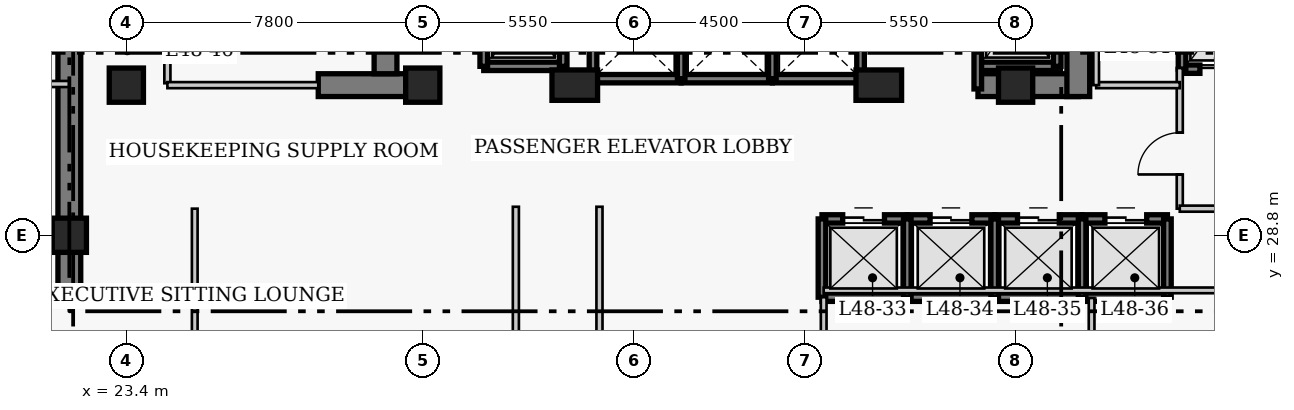
"""IFC4 building model, lengths in metres.
Left out: names, types, materials, properties, quantities, classifications, styles, units other than length and angle.
Written with IfcOpenShell. Run it as: python <this file> out.ifc"""

import sys

from ifc_helpers import new_model, si_unit, direction, frame, frame_2d, origin, origin_2d, place, context, subcontext, project, spatial, rectangle, extrude, element, fill, save


model = new_model("IFC4")
c1 = context("Model", 3, precision=1e-05, world=origin(), true_north=direction((0.0, 1.0)))
c2 = subcontext(c1, "Body", "Model", "MODEL_VIEW")
j1 = project(units=[si_unit("LENGTHUNIT", "METRE"), si_unit("PLANEANGLEUNIT", "RADIAN")], contexts=[c1])
p1 = place(None, origin())
s1 = spatial("IfcSite", under=j1, at=p1, CompositionType="ELEMENT")
p2 = place(p1, origin())
s2 = spatial("IfcBuilding", under=s1, at=p2, CompositionType="ELEMENT")
p3 = place(p2, frame((0.0, 0.0, 192.9)))
s3 = spatial("IfcBuildingStorey", under=s2, at=p3, CompositionType="ELEMENT", Elevation=192.9)
p4 = place(p3, frame((21.9, 27.05, 0.0), z_axis=(0.0, 0.0, 1.0), x_axis=(0.0, 1.0, 0.0)))
e1 = element("IfcWall", 1, at=p4, inside=s3, PredefinedType="SHEAR", context=c2, shape_type="SweptSolid", body=[
    extrude(rectangle(XDim=13.57, YDim=0.6, at=frame_2d((6.785, 0.0))), origin(), (0.0, 0.0, 1.0), 3.9),
])
p5 = place(p3, frame((28.45, 32.75, 0.0), z_axis=(0.0, 0.0, 1.0), x_axis=(1.0, 0.0, 0.0)))
e2 = element("IfcWall", 2, at=p5, inside=s3, PredefinedType="SHEAR", context=c2, shape_type="SweptSolid", body=[
    extrude(rectangle(XDim=2.4, YDim=0.6, at=frame_2d((1.2, 0.0))), origin(), (0.0, 0.0, 1.0), 3.9),
])
p6 = place(p3, frame((45.81, 32.75, 0.0), z_axis=(0.0, 0.0, 1.0), x_axis=(1.0, 0.0, 0.0)))
e3 = element("IfcWall", 3, at=p6, inside=s3, PredefinedType="SHEAR", context=c2, shape_type="SweptSolid", body=[
    extrude(rectangle(XDim=2.64, YDim=0.6, at=frame_2d((1.32, 0.0))), origin(), (0.0, 0.0, 1.0), 3.9),
])
p7 = place(p3, frame((30.22, 33.05, 0.0), z_axis=(0.0, 0.0, 1.0), x_axis=(0.0, 1.0, 0.0)))
e4 = element("IfcWall", 4, at=p7, inside=s3, PredefinedType="SHEAR", context=c2, shape_type="SweptSolid", body=[
    extrude(rectangle(XDim=7.27, YDim=0.6, at=frame_2d((3.635, 0.0))), origin(), (0.0, 0.0, 1.0), 3.9),
])
p8 = place(p3, frame((48.45, 32.45, 0.0), z_axis=(0.0, 0.0, 1.0), x_axis=(0.0, 1.0, 0.0)))
e5 = element("IfcWall", 5, at=p8, inside=s3, PredefinedType="SHEAR", context=c2, shape_type="SweptSolid", body=[
    extrude(rectangle(XDim=7.87, YDim=0.6, at=frame_2d((3.935, 0.0))), origin(), (0.0, 0.0, 1.0), 3.9),
])
p9 = place(p8, frame((5.75, 0.0, 0.0)))
e6 = element("IfcOpeningElement", 6, at=p9, cuts=e5, PredefinedType="OPENING", context=c2, shape_type="SweptSolid", body=[
    extrude(rectangle(XDim=1.1, YDim=2.15, at=frame_2d((0.55, 1.075))), frame((0.0, 0.31, 0.0), z_axis=(0.0, -1.0, 0.0), x_axis=(1.0, 0.0, 0.0)), (0.0, 0.0, 1.0), 0.62),
])
for number, where, z_axis, x_axis in (
    (7, (21.9, 28.8, 0.0), (0.0, 0.0, 1.0), (1.0, 0.0, 0.0)),
    (8, (23.4, 32.75, 0.0), (0.0, 0.0, 1.0), (1.0, 0.0, 0.0)),
    (9, (31.2, 32.75, 0.0), (0.0, 0.0, 1.0), (1.0, 0.0, 0.0)),
):
    element("IfcColumn", number, at=place(p3, frame(where, z_axis=z_axis, x_axis=x_axis)), inside=s3, PredefinedType="COLUMN", context=c2, shape_type="SweptSolid", body=[
        extrude(rectangle(XDim=0.9, YDim=0.9, at=origin_2d()), origin(), (0.0, 0.0, 1.0), 3.9),
    ])
for number, where, z_axis, x_axis in (
    (10, (35.2, 32.75, 0.0), (0.0, 0.0, 1.0), (1.0, 0.0, 0.0)),
    (11, (43.2, 32.75, 0.0), (0.0, 0.0, 1.0), (1.0, 0.0, 0.0)),
):
    element("IfcColumn", number, at=place(p3, frame(where, z_axis=z_axis, x_axis=x_axis)), inside=s3, PredefinedType="COLUMN", context=c2, shape_type="SweptSolid", body=[
        extrude(rectangle(XDim=1.2, YDim=0.8, at=origin_2d()), origin(), (0.0, 0.0, 1.0), 3.9),
    ])
p10 = place(p3, frame((46.8, 32.75, 0.0), z_axis=(0.0, 0.0, 1.0), x_axis=(1.0, 0.0, 0.0)))
e12 = element("IfcColumn", 12, at=p10, inside=s3, PredefinedType="COLUMN", context=c2, shape_type="SweptSolid", body=[
    extrude(rectangle(XDim=0.9, YDim=0.9, at=origin_2d()), origin(), (0.0, 0.0, 1.0), 3.9),
])
p11 = place(p3, frame((41.705, 29.23, 0.0), z_axis=(0.0, 0.0, 1.0), x_axis=(1.0, 0.0, 0.0)))
e13 = element("IfcWall", 13, at=p11, inside=s3, PredefinedType="SHEAR", context=c2, shape_type="SweptSolid", body=[
    extrude(rectangle(XDim=2.245, YDim=0.22, at=frame_2d((1.123, 0.0))), origin(), (0.0, 0.0, 1.0), 3.9),
])
p12 = place(p11, frame((0.545, 0.0, 0.0)))
e14 = element("IfcOpeningElement", 14, at=p12, cuts=e13, PredefinedType="OPENING", context=c2, shape_type="SweptSolid", body=[
    extrude(rectangle(XDim=1.1, YDim=2.15, at=frame_2d((0.55, 1.075))), frame((0.0, 0.12, 0.0), z_axis=(0.0, -1.0, 0.0), x_axis=(1.0, 0.0, 0.0)), (0.0, 0.0, 1.0), 0.24),
])
p13 = place(p3, frame((41.705, 27.17, 0.0), z_axis=(0.0, 0.0, 1.0), x_axis=(1.0, 0.0, 0.0)))
e15 = element("IfcWall", 15, at=p13, inside=s3, PredefinedType="SHEAR", context=c2, shape_type="SweptSolid", body=[
    extrude(rectangle(XDim=2.245, YDim=0.22, at=frame_2d((1.123, 0.0))), origin(), (0.0, 0.0, 1.0), 3.9),
])
p14 = place(p3, frame((41.705, 27.17, 0.0), z_axis=(0.0, 0.0, 1.0), x_axis=(0.0, 1.0, 0.0)))
e16 = element("IfcWall", 16, at=p14, inside=s3, PredefinedType="SHEAR", context=c2, shape_type="SweptSolid", body=[
    extrude(rectangle(XDim=2.06, YDim=0.2, at=frame_2d((1.03, 0.0))), origin(), (0.0, 0.0, 1.0), 3.9),
])
p15 = place(p3, frame((43.95, 29.23, 0.0), z_axis=(0.0, 0.0, 1.0), x_axis=(1.0, 0.0, 0.0)))
e17 = element("IfcWall", 17, at=p15, inside=s3, PredefinedType="SHEAR", context=c2, shape_type="SweptSolid", body=[
    extrude(rectangle(XDim=2.3, YDim=0.22, at=frame_2d((1.15, 0.0))), origin(), (0.0, 0.0, 1.0), 3.9),
])
p16 = place(p15, frame((0.6, 0.0, 0.0)))
e18 = element("IfcOpeningElement", 18, at=p16, cuts=e17, PredefinedType="OPENING", context=c2, shape_type="SweptSolid", body=[
    extrude(rectangle(XDim=1.1, YDim=2.15, at=frame_2d((0.55, 1.075))), frame((0.0, 0.12, 0.0), z_axis=(0.0, -1.0, 0.0), x_axis=(1.0, 0.0, 0.0)), (0.0, 0.0, 1.0), 0.24),
])
p17 = place(p3, frame((43.95, 27.17, 0.0), z_axis=(0.0, 0.0, 1.0), x_axis=(1.0, 0.0, 0.0)))
e19 = element("IfcWall", 19, at=p17, inside=s3, PredefinedType="SHEAR", context=c2, shape_type="SweptSolid", body=[
    extrude(rectangle(XDim=2.3, YDim=0.22, at=frame_2d((1.15, 0.0))), origin(), (0.0, 0.0, 1.0), 3.9),
])
p18 = place(p3, frame((43.95, 27.17, 0.0), z_axis=(0.0, 0.0, 1.0), x_axis=(0.0, 1.0, 0.0)))
e20 = element("IfcWall", 20, at=p18, inside=s3, PredefinedType="SHEAR", context=c2, shape_type="SweptSolid", body=[
    extrude(rectangle(XDim=2.06, YDim=0.2, at=frame_2d((1.03, 0.0))), origin(), (0.0, 0.0, 1.0), 3.9),
])
p19 = place(p3, frame((46.25, 29.23, 0.0), z_axis=(0.0, 0.0, 1.0), x_axis=(1.0, 0.0, 0.0)))
e21 = element("IfcWall", 21, at=p19, inside=s3, PredefinedType="SHEAR", context=c2, shape_type="SweptSolid", body=[
    extrude(rectangle(XDim=2.3, YDim=0.22, at=frame_2d((1.15, 0.0))), origin(), (0.0, 0.0, 1.0), 3.9),
])
p20 = place(p19, frame((0.6, 0.0, 0.0)))
e22 = element("IfcOpeningElement", 22, at=p20, cuts=e21, PredefinedType="OPENING", context=c2, shape_type="SweptSolid", body=[
    extrude(rectangle(XDim=1.1, YDim=2.15, at=frame_2d((0.55, 1.075))), frame((0.0, 0.12, 0.0), z_axis=(0.0, -1.0, 0.0), x_axis=(1.0, 0.0, 0.0)), (0.0, 0.0, 1.0), 0.24),
])
p21 = place(p3, frame((46.25, 27.17, 0.0), z_axis=(0.0, 0.0, 1.0), x_axis=(1.0, 0.0, 0.0)))
e23 = element("IfcWall", 23, at=p21, inside=s3, PredefinedType="SHEAR", context=c2, shape_type="SweptSolid", body=[
    extrude(rectangle(XDim=2.3, YDim=0.22, at=frame_2d((1.15, 0.0))), origin(), (0.0, 0.0, 1.0), 3.9),
])
p22 = place(p3, frame((46.25, 27.17, 0.0), z_axis=(0.0, 0.0, 1.0), x_axis=(0.0, 1.0, 0.0)))
e24 = element("IfcWall", 24, at=p22, inside=s3, PredefinedType="SHEAR", context=c2, shape_type="SweptSolid", body=[
    extrude(rectangle(XDim=2.06, YDim=0.2, at=frame_2d((1.03, 0.0))), origin(), (0.0, 0.0, 1.0), 3.9),
])
p23 = place(p3, frame((48.55, 29.23, 0.0), z_axis=(0.0, 0.0, 1.0), x_axis=(1.0, 0.0, 0.0)))
e25 = element("IfcWall", 25, at=p23, inside=s3, PredefinedType="SHEAR", context=c2, shape_type="SweptSolid", body=[
    extrude(rectangle(XDim=2.245, YDim=0.22, at=frame_2d((1.123, 0.0))), origin(), (0.0, 0.0, 1.0), 3.9),
])
p24 = place(p23, frame((0.6, 0.0, 0.0)))
e26 = element("IfcOpeningElement", 26, at=p24, cuts=e25, PredefinedType="OPENING", context=c2, shape_type="SweptSolid", body=[
    extrude(rectangle(XDim=1.1, YDim=2.15, at=frame_2d((0.55, 1.075))), frame((0.0, 0.12, 0.0), z_axis=(0.0, -1.0, 0.0), x_axis=(1.0, 0.0, 0.0)), (0.0, 0.0, 1.0), 0.24),
])
p25 = place(p3, frame((48.55, 27.17, 0.0), z_axis=(0.0, 0.0, 1.0), x_axis=(1.0, 0.0, 0.0)))
e27 = element("IfcWall", 27, at=p25, inside=s3, PredefinedType="SHEAR", context=c2, shape_type="SweptSolid", body=[
    extrude(rectangle(XDim=2.245, YDim=0.22, at=frame_2d((1.123, 0.0))), origin(), (0.0, 0.0, 1.0), 3.9),
])
for number, where, z_axis, x_axis in (
    (28, (48.55, 27.17, 0.0), (0.0, 0.0, 1.0), (0.0, 1.0, 0.0)),
    (29, (50.795, 27.17, 0.0), (0.0, 0.0, 1.0), (0.0, 1.0, 0.0)),
):
    element("IfcWall", number, at=place(p3, frame(where, z_axis=z_axis, x_axis=x_axis)), inside=s3, PredefinedType="SHEAR", context=c2, shape_type="SweptSolid", body=[
        extrude(rectangle(XDim=2.06, YDim=0.2, at=frame_2d((1.03, 0.0))), origin(), (0.0, 0.0, 1.0), 3.9),
    ])
p26 = place(p3, frame((35.68, 32.92, 0.0), z_axis=(0.0, 0.0, 1.0), x_axis=(1.0, 0.0, 0.0)))
e30 = element("IfcWall", 30, at=p26, inside=s3, PredefinedType="SHEAR", context=c2, shape_type="SweptSolid", body=[
    extrude(rectangle(XDim=2.32, YDim=0.22, at=frame_2d((1.16, 0.0))), origin(), (0.0, 0.0, 1.0), 3.9),
])
p27 = place(p3, frame((35.68, 32.92, 0.0), z_axis=(0.0, 0.0, 1.0), x_axis=(0.0, 1.0, 0.0)))
e31 = element("IfcWall", 31, at=p27, inside=s3, PredefinedType="SHEAR", context=c2, shape_type="SweptSolid", body=[
    extrude(rectangle(XDim=2.16, YDim=0.2, at=frame_2d((1.08, 0.0))), origin(), (0.0, 0.0, 1.0), 3.9),
])
p28 = place(p3, frame((38.0, 32.92, 0.0), z_axis=(0.0, 0.0, 1.0), x_axis=(1.0, 0.0, 0.0)))
e32 = element("IfcWall", 32, at=p28, inside=s3, PredefinedType="SHEAR", context=c2, shape_type="SweptSolid", body=[
    extrude(rectangle(XDim=2.4, YDim=0.22, at=frame_2d((1.2, 0.0))), origin(), (0.0, 0.0, 1.0), 3.9),
])
p29 = place(p3, frame((38.0, 32.92, 0.0), z_axis=(0.0, 0.0, 1.0), x_axis=(0.0, 1.0, 0.0)))
e33 = element("IfcWall", 33, at=p29, inside=s3, PredefinedType="SHEAR", context=c2, shape_type="SweptSolid", body=[
    extrude(rectangle(XDim=2.16, YDim=0.2, at=frame_2d((1.08, 0.0))), origin(), (0.0, 0.0, 1.0), 3.9),
])
p30 = place(p3, frame((40.4, 32.92, 0.0), z_axis=(0.0, 0.0, 1.0), x_axis=(1.0, 0.0, 0.0)))
e34 = element("IfcWall", 34, at=p30, inside=s3, PredefinedType="SHEAR", context=c2, shape_type="SweptSolid", body=[
    extrude(rectangle(XDim=2.32, YDim=0.22, at=frame_2d((1.16, 0.0))), origin(), (0.0, 0.0, 1.0), 3.9),
])
for number, where, z_axis, x_axis in (
    (35, (40.4, 32.92, 0.0), (0.0, 0.0, 1.0), (0.0, 1.0, 0.0)),
    (36, (42.72, 32.92, 0.0), (0.0, 0.0, 1.0), (0.0, 1.0, 0.0)),
):
    element("IfcWall", number, at=place(p3, frame(where, z_axis=z_axis, x_axis=x_axis)), inside=s3, PredefinedType="SHEAR", context=c2, shape_type="SweptSolid", body=[
        extrude(rectangle(XDim=2.16, YDim=0.2, at=frame_2d((1.08, 0.0))), origin(), (0.0, 0.0, 1.0), 3.9),
    ])
p31 = place(p3, frame((51.18, 33.17, 0.0), z_axis=(0.0, 0.0, 1.0), x_axis=(1.0, 0.0, 0.0)))
e37 = element("IfcWall", 37, at=p31, inside=s3, PredefinedType="SHEAR", context=c2, shape_type="SweptSolid", body=[
    extrude(rectangle(XDim=2.42, YDim=0.22, at=frame_2d((1.21, 0.0))), origin(), (0.0, 0.0, 1.0), 3.9),
])
p32 = place(p31, frame((0.47, 0.0, 0.0)))
e38 = element("IfcOpeningElement", 38, at=p32, cuts=e37, PredefinedType="OPENING", context=c2, shape_type="SweptSolid", body=[
    extrude(rectangle(XDim=1.3, YDim=2.15, at=frame_2d((0.65, 1.075))), frame((0.0, 0.12, 0.0), z_axis=(0.0, -1.0, 0.0), x_axis=(1.0, 0.0, 0.0)), (0.0, 0.0, 1.0), 0.24),
])
p33 = place(p3, frame((51.18, 33.17, 0.0), z_axis=(0.0, 0.0, 1.0), x_axis=(0.0, 1.0, 0.0)))
e39 = element("IfcWall", 39, at=p33, inside=s3, PredefinedType="SHEAR", context=c2, shape_type="SweptSolid", body=[
    extrude(rectangle(XDim=2.86, YDim=0.2, at=frame_2d((1.43, 0.0))), origin(), (0.0, 0.0, 1.0), 3.9),
])
p34 = place(p3, frame((32.805, 33.245, 0.0), z_axis=(0.0, 0.0, 1.0), x_axis=(1.0, 0.0, 0.0)))
e40 = element("IfcWall", 40, at=p34, inside=s3, PredefinedType="SHEAR", context=c2, shape_type="SweptSolid", body=[
    extrude(rectangle(XDim=2.09, YDim=0.22, at=frame_2d((1.045, 0.0))), origin(), (0.0, 0.0, 1.0), 3.9),
])
for number, where, z_axis, x_axis in (
    (41, (32.805, 33.245, 0.0), (0.0, 0.0, 1.0), (0.0, 1.0, 0.0)),
    (42, (34.895, 33.245, 0.0), (0.0, 0.0, 1.0), (0.0, 1.0, 0.0)),
):
    element("IfcWall", number, at=place(p3, frame(where, z_axis=z_axis, x_axis=x_axis)), inside=s3, PredefinedType="SHEAR", context=c2, shape_type="SweptSolid", body=[
        extrude(rectangle(XDim=2.91, YDim=0.2, at=frame_2d((1.455, 0.0))), origin(), (0.0, 0.0, 1.0), 3.9),
    ])
p35 = place(p3, frame((45.805, 33.245, 0.0), z_axis=(0.0, 0.0, 1.0), x_axis=(1.0, 0.0, 0.0)))
e43 = element("IfcWall", 43, at=p35, inside=s3, PredefinedType="SHEAR", context=c2, shape_type="SweptSolid", body=[
    extrude(rectangle(XDim=2.09, YDim=0.22, at=frame_2d((1.045, 0.0))), origin(), (0.0, 0.0, 1.0), 3.9),
])
p36 = place(p3, frame((45.805, 32.65, 0.0), z_axis=(0.0, 0.0, 1.0), x_axis=(0.0, 1.0, 0.0)))
e44 = element("IfcWall", 44, at=p36, inside=s3, PredefinedType="SHEAR", context=c2, shape_type="SweptSolid", body=[
    extrude(rectangle(XDim=3.505, YDim=0.2, at=frame_2d((1.752, 0.0))), origin(), (0.0, 0.0, 1.0), 3.9),
])
p37 = place(p3, frame((47.895, 33.245, 0.0), z_axis=(0.0, 0.0, 1.0), x_axis=(0.0, 1.0, 0.0)))
e45 = element("IfcWall", 45, at=p37, inside=s3, PredefinedType="SHEAR", context=c2, shape_type="SweptSolid", body=[
    extrude(rectangle(XDim=2.91, YDim=0.2, at=frame_2d((1.455, 0.0))), origin(), (0.0, 0.0, 1.0), 3.9),
])
p38 = place(p3, frame((24.48, 32.8, 0.0), z_axis=(0.0, 0.0, 1.0), x_axis=(0.0, 1.0, 0.0)))
e46 = element("IfcWall", 46, at=p38, inside=s3, PredefinedType="PARTITIONING", context=c2, shape_type="SweptSolid", body=[
    extrude(rectangle(XDim=3.57, YDim=0.16, at=frame_2d((1.785, 0.0))), origin(), (0.0, 0.0, 1.0), 3.65),
])
p39 = place(p38, frame((1.604, 0.0, 0.0)))
e47 = element("IfcOpeningElement", 47, at=p39, cuts=e46, PredefinedType="OPENING", context=c2, shape_type="SweptSolid", body=[
    extrude(rectangle(XDim=0.9, YDim=2.1, at=frame_2d((0.45, 1.05))), frame((0.0, 0.09, 0.0), z_axis=(0.0, -1.0, 0.0), x_axis=(1.0, 0.0, 0.0)), (0.0, 0.0, 1.0), 0.18),
])
p40 = place(p3, frame((51.12, 29.5, 0.0), z_axis=(0.0, 0.0, 1.0), x_axis=(0.0, 1.0, 0.0)))
e48 = element("IfcWall", 48, at=p40, inside=s3, PredefinedType="PARTITIONING", context=c2, shape_type="SweptSolid", body=[
    extrude(rectangle(XDim=3.7, YDim=0.16, at=frame_2d((1.85, 0.0))), origin(), (0.0, 0.0, 1.0), 3.65),
])
p41 = place(p40, frame((0.9, 0.0, 0.0)))
e49 = element("IfcOpeningElement", 49, at=p41, cuts=e48, PredefinedType="OPENING", context=c2, shape_type="SweptSolid", body=[
    extrude(rectangle(XDim=1.1, YDim=2.15, at=frame_2d((0.55, 1.075))), frame((0.0, 0.09, 0.0), z_axis=(0.0, -1.0, 0.0), x_axis=(1.0, 0.0, 0.0)), (0.0, 0.0, 1.0), 0.18),
])
p42 = place(p3, frame((51.12, 29.5, 0.0), z_axis=(0.0, 0.0, 1.0), x_axis=(1.0, 0.0, 0.0)))
e50 = element("IfcWall", 50, at=p42, inside=s3, PredefinedType="PARTITIONING", context=c2, shape_type="SweptSolid", body=[
    extrude(rectangle(XDim=5.63, YDim=0.16, at=frame_2d((2.815, 0.0))), origin(), (0.0, 0.0, 1.0), 3.65),
])
p43 = place(p3, frame((24.48, 32.75, 0.0), z_axis=(0.0, 0.0, 1.0), x_axis=(1.0, 0.0, 0.0)))
e51 = element("IfcWall", 51, at=p43, inside=s3, PredefinedType="PARTITIONING", context=c2, shape_type="SweptSolid", body=[
    extrude(rectangle(XDim=3.97, YDim=0.16, at=frame_2d((1.985, 0.0))), origin(), (0.0, 0.0, 1.0), 3.65),
])
p44 = place(p3, frame((48.92, 32.75, 0.0), z_axis=(0.0, 0.0, 1.0), x_axis=(1.0, 0.0, 0.0)))
e52 = element("IfcWall", 52, at=p44, inside=s3, PredefinedType="PARTITIONING", context=c2, shape_type="SweptSolid", body=[
    extrude(rectangle(XDim=2.2, YDim=0.16, at=frame_2d((1.1, 0.0))), origin(), (0.0, 0.0, 1.0), 3.65),
])
p45 = place(p3, frame((48.92, 32.75, 0.0), z_axis=(0.0, 0.0, 1.0), x_axis=(0.0, 1.0, 0.0)))
e53 = element("IfcWall", 53, at=p45, inside=s3, PredefinedType="PARTITIONING", context=c2, shape_type="SweptSolid", body=[
    extrude(rectangle(XDim=3.62, YDim=0.15, at=frame_2d((1.81, 0.0))), origin(), (0.0, 0.0, 1.0), 3.65),
])
for number, where, z_axis, x_axis in (
    (54, (33.65, 19.16, 0.0), (0.0, 0.0, 1.0), (0.0, 1.0, 0.0)),
    (55, (35.85, 19.16, 0.0), (0.0, 0.0, 1.0), (0.0, 1.0, 0.0)),
):
    element("IfcWall", number, at=place(p3, frame(where, z_axis=z_axis, x_axis=x_axis)), inside=s3, PredefinedType="PARTITIONING", context=c2, shape_type="SweptSolid", body=[
        extrude(rectangle(XDim=10.39, YDim=0.16, at=frame_2d((5.195, 0.0))), origin(), (0.0, 0.0, 1.0), 3.65),
    ])
p46 = place(p3, frame((19.96, 32.78, 0.0), z_axis=(0.0, 0.0, 1.0), x_axis=(1.0, 0.0, 0.0)))
e56 = element("IfcWall", 56, at=p46, inside=s3, PredefinedType="PARTITIONING", context=c2, shape_type="SweptSolid", body=[
    extrude(rectangle(XDim=1.94, YDim=0.16, at=frame_2d((0.97, 0.0))), origin(), (0.0, 0.0, 1.0), 3.65),
])
p47 = place(p3, frame((25.2, 19.16, 0.0), z_axis=(0.0, 0.0, 1.0), x_axis=(0.0, 1.0, 0.0)))
e57 = element("IfcWall", 57, at=p47, inside=s3, PredefinedType="PARTITIONING", context=c2, shape_type="SweptSolid", body=[
    extrude(rectangle(XDim=10.34, YDim=0.15, at=frame_2d((5.17, 0.0))), origin(), (0.0, 0.0, 1.0), 3.65),
])
p48 = place(p3, frame((41.75, 19.16, 0.0), z_axis=(0.0, 0.0, 1.0), x_axis=(0.0, 1.0, 0.0)))
e58 = element("IfcWall", 58, at=p48, inside=s3, PredefinedType="PARTITIONING", context=c2, shape_type="SweptSolid", body=[
    extrude(rectangle(XDim=8.01, YDim=0.15, at=frame_2d((4.005, 0.0))), origin(), (0.0, 0.0, 1.0), 3.65),
])
p49 = place(p3, frame((48.8, 19.16, 0.0), z_axis=(0.0, 0.0, 1.0), x_axis=(0.0, 1.0, 0.0)))
e59 = element("IfcWall", 59, at=p49, inside=s3, PredefinedType="PARTITIONING", context=c2, shape_type="SweptSolid", body=[
    extrude(rectangle(XDim=7.99, YDim=0.15, at=frame_2d((3.995, 0.0))), origin(), (0.0, 0.0, 1.0), 3.65),
])
p50 = place(p3, frame((41.75, 27.35, 0.0), z_axis=(0.0, 0.0, 1.0), x_axis=(1.0, 0.0, 0.0)))
e60 = element("IfcWall", 60, at=p50, inside=s3, PredefinedType="PARTITIONING", context=c2, shape_type="SweptSolid", body=[
    extrude(rectangle(XDim=17.04, YDim=0.15, at=frame_2d((8.52, 0.0))), origin(), (0.0, 0.0, 1.0), 3.65),
])
p51 = place(p12, origin())
e61 = element("IfcDoor", 61, at=p51, inside=s3, OperationType="DOUBLE_DOOR_SLIDING", PredefinedType="DOOR", context=c2, shape_type="SweptSolid", body=[
    extrude(rectangle(XDim=1.1, YDim=2.15, at=frame_2d((0.55, 1.075))), frame((0.0, 0.025, 0.0), z_axis=(0.0, -1.0, 0.0), x_axis=(1.0, 0.0, 0.0)), (0.0, 0.0, 1.0), 0.05),
])
fill(e14, e61)
p52 = place(p16, origin())
e62 = element("IfcDoor", 62, at=p52, inside=s3, OperationType="DOUBLE_DOOR_SLIDING", PredefinedType="DOOR", context=c2, shape_type="SweptSolid", body=[
    extrude(rectangle(XDim=1.1, YDim=2.15, at=frame_2d((0.55, 1.075))), frame((0.0, 0.025, 0.0), z_axis=(0.0, -1.0, 0.0), x_axis=(1.0, 0.0, 0.0)), (0.0, 0.0, 1.0), 0.05),
])
fill(e18, e62)
p53 = place(p20, origin())
e63 = element("IfcDoor", 63, at=p53, inside=s3, OperationType="DOUBLE_DOOR_SLIDING", PredefinedType="DOOR", context=c2, shape_type="SweptSolid", body=[
    extrude(rectangle(XDim=1.1, YDim=2.15, at=frame_2d((0.55, 1.075))), frame((0.0, 0.025, 0.0), z_axis=(0.0, -1.0, 0.0), x_axis=(1.0, 0.0, 0.0)), (0.0, 0.0, 1.0), 0.05),
])
fill(e22, e63)
p54 = place(p24, origin())
e64 = element("IfcDoor", 64, at=p54, inside=s3, OperationType="DOUBLE_DOOR_SLIDING", PredefinedType="DOOR", context=c2, shape_type="SweptSolid", body=[
    extrude(rectangle(XDim=1.1, YDim=2.15, at=frame_2d((0.55, 1.075))), frame((0.0, 0.025, 0.0), z_axis=(0.0, -1.0, 0.0), x_axis=(1.0, 0.0, 0.0)), (0.0, 0.0, 1.0), 0.05),
])
fill(e26, e64)
p55 = place(p32, origin())
e65 = element("IfcDoor", 65, at=p55, inside=s3, OperationType="DOUBLE_DOOR_SLIDING", PredefinedType="DOOR", context=c2, shape_type="SweptSolid", body=[
    extrude(rectangle(XDim=1.3, YDim=2.15, at=frame_2d((0.65, 1.075))), frame((0.0, 0.025, 0.0), z_axis=(0.0, -1.0, 0.0), x_axis=(1.0, 0.0, 0.0)), (0.0, 0.0, 1.0), 0.05),
])
fill(e38, e65)
p56 = place(p41, origin())
e66 = element("IfcDoor", 66, at=p56, inside=s3, OperationType="SINGLE_SWING_LEFT", PredefinedType="DOOR", context=c2, shape_type="SweptSolid", body=[
    extrude(rectangle(XDim=1.1, YDim=2.15, at=frame_2d((0.55, 1.075))), frame((0.0, 0.025, 0.0), z_axis=(0.0, -1.0, 0.0), x_axis=(1.0, 0.0, 0.0)), (0.0, 0.0, 1.0), 0.05),
])
fill(e49, e66)
save(model, sys.argv[1])
